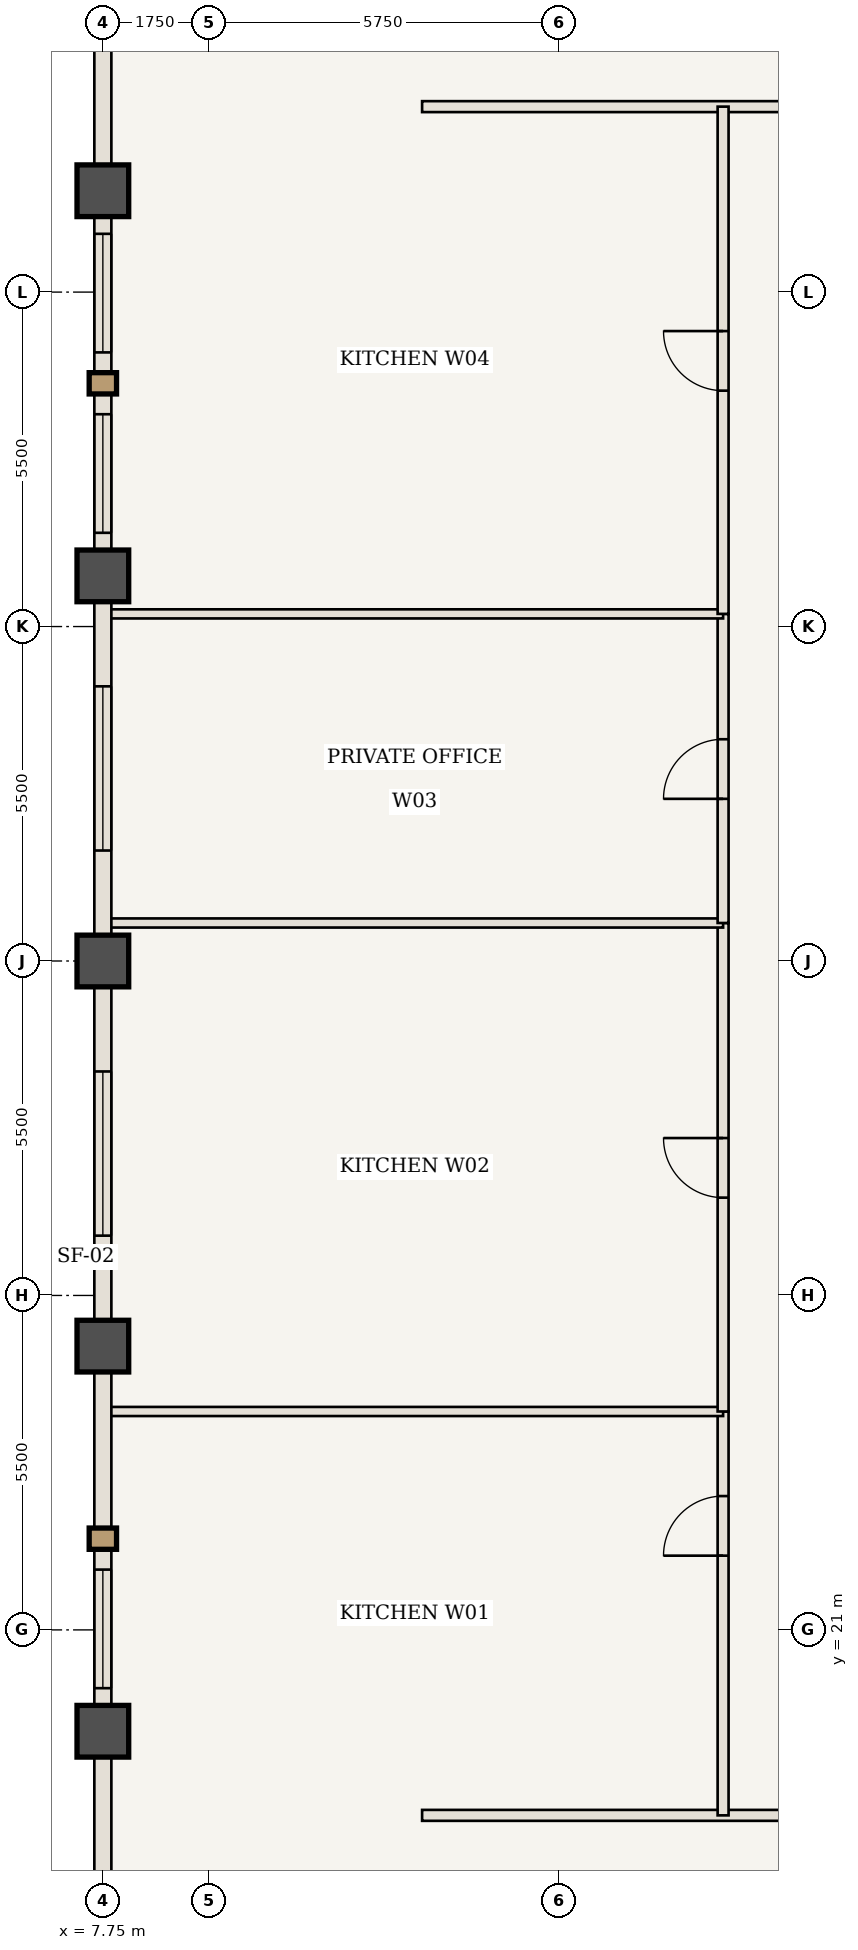
"""IFC4 building model, lengths in metres.
Left out: names, types, materials, properties, quantities, classifications, styles, units other than length and angle.
Written with IfcOpenShell. Run it as: python <this file> out.ifc"""

import sys

from ifc_helpers import new_model, si_unit, direction, frame, frame_2d, origin, origin_2d, place, context, subcontext, project, spatial, rectangle, extrude, element, fill, save


model = new_model("IFC4")
c1 = context("Model", 3, precision=1e-05, world=origin(), true_north=direction((0.0, 1.0)))
c2 = subcontext(c1, "Body", "Model", "MODEL_VIEW")
j1 = project(units=[si_unit("LENGTHUNIT", "METRE"), si_unit("PLANEANGLEUNIT", "RADIAN")], contexts=[c1])
p1 = place(None, origin())
s1 = spatial("IfcSite", under=j1, at=p1, CompositionType="ELEMENT")
p2 = place(p1, origin())
s2 = spatial("IfcBuilding", under=s1, at=p2, CompositionType="ELEMENT")
p3 = place(p2, frame((0.0, 0.0, 229.25)))
s3 = spatial("IfcBuildingStorey", under=s2, at=p3, CompositionType="ELEMENT", Elevation=229.25)
for number, where, z_axis, x_axis in (
    (1, (7.75, 19.333, 0.0), (0.0, 0.0, 1.0), (1.0, 0.0, 0.0)),
    (2, (7.75, 25.667, 0.0), (0.0, 0.0, 1.0), (1.0, 0.0, 0.0)),
    (3, (7.75, 32.0, 0.0), (0.0, 0.0, 1.0), (1.0, 0.0, 0.0)),
    (4, (7.75, 38.333, 0.0), (0.0, 0.0, 1.0), (1.0, 0.0, 0.0)),
    (5, (7.75, 44.667, 0.0), (0.0, 0.0, 1.0), (1.0, 0.0, 0.0)),
):
    element("IfcColumn", number, at=place(p3, frame(where, z_axis=z_axis, x_axis=x_axis)), inside=s3, PredefinedType="COLUMN", context=c2, shape_type="SweptSolid", body=[
        extrude(rectangle(XDim=0.85, YDim=0.85, at=origin_2d()), origin(), (0.0, 0.0, 1.0), 3.85),
    ])
p4 = place(p3, frame((13.0, 17.95, 0.0), z_axis=(0.0, 0.0, 1.0), x_axis=(1.0, 0.0, 0.0)))
e6 = element("IfcWall", 6, at=p4, inside=s3, PredefinedType="STANDARD", context=c2, shape_type="SweptSolid", body=[
    extrude(rectangle(XDim=13.292, YDim=0.18, at=frame_2d((6.646, 0.0))), origin(), (0.0, 0.0, 1.0), 3.685),
])
p5 = place(p4, frame((8.621, 0.0, 0.0)))
e7 = element("IfcOpeningElement", 7, at=p5, cuts=e6, PredefinedType="OPENING", context=c2, shape_type="SweptSolid", body=[
    extrude(rectangle(XDim=0.98, YDim=2.2, at=frame_2d((0.49, 1.1))), frame((0.0, 0.1, 0.0), z_axis=(0.0, -1.0, 0.0), x_axis=(1.0, 0.0, 0.0)), (0.0, 0.0, 1.0), 0.2),
])
p6 = place(p3, frame((13.0, 46.05, 0.0), z_axis=(0.0, 0.0, 1.0), x_axis=(1.0, 0.0, 0.0)))
e8 = element("IfcWall", 8, at=p6, inside=s3, PredefinedType="STANDARD", context=c2, shape_type="SweptSolid", body=[
    extrude(rectangle(XDim=38.0, YDim=0.18, at=frame_2d((19.0, 0.0))), origin(), (0.0, 0.0, 1.0), 3.685),
])
p7 = place(p6, frame((19.7, 0.0, 0.0)))
e9 = element("IfcOpeningElement", 9, at=p7, cuts=e8, PredefinedType="OPENING", context=c2, shape_type="SweptSolid", body=[
    extrude(rectangle(XDim=0.98, YDim=2.2, at=frame_2d((0.49, 1.1))), frame((0.0, 0.1, 0.0), z_axis=(0.0, -1.0, 0.0), x_axis=(1.0, 0.0, 0.0)), (0.0, 0.0, 1.0), 0.2),
])
p8 = place(p3, frame((17.95, 17.95, 0.0), z_axis=(0.0, 0.0, 1.0), x_axis=(0.0, 1.0, 0.0)))
e10 = element("IfcWall", 10, at=p8, inside=s3, PredefinedType="STANDARD", context=c2, shape_type="SweptSolid", body=[
    extrude(rectangle(XDim=6.642, YDim=0.18, at=frame_2d((3.321, 0.0))), origin(), (0.0, 0.0, 1.0), 3.685),
])
p9 = place(p8, frame((4.271, 0.0, 0.0)))
e11 = element("IfcOpeningElement", 11, at=p9, cuts=e10, PredefinedType="OPENING", context=c2, shape_type="SweptSolid", body=[
    extrude(rectangle(XDim=0.98, YDim=2.2, at=frame_2d((0.49, 1.1))), frame((0.0, 0.1, 0.0), z_axis=(0.0, -1.0, 0.0), x_axis=(1.0, 0.0, 0.0)), (0.0, 0.0, 1.0), 0.2),
])
p10 = place(p3, frame((7.81, 24.592, 0.0), z_axis=(0.0, 0.0, 1.0), x_axis=(1.0, 0.0, 0.0)))
e12 = element("IfcWall", 12, at=p10, inside=s3, PredefinedType="STANDARD", context=c2, shape_type="SweptSolid", body=[
    extrude(rectangle(XDim=10.14, YDim=0.15, at=frame_2d((5.07, 0.0))), origin(), (0.0, 0.0, 1.0), 3.685),
])
p11 = place(p3, frame((17.95, 24.592, 0.0), z_axis=(0.0, 0.0, 1.0), x_axis=(0.0, 1.0, 0.0)))
e13 = element("IfcWall", 13, at=p11, inside=s3, PredefinedType="STANDARD", context=c2, shape_type="SweptSolid", body=[
    extrude(rectangle(XDim=8.033, YDim=0.18, at=frame_2d((4.017, 0.0))), origin(), (0.0, 0.0, 1.0), 3.685),
])
p12 = place(p11, frame((3.517, 0.0, 0.0)))
e14 = element("IfcOpeningElement", 14, at=p12, cuts=e13, PredefinedType="OPENING", context=c2, shape_type="SweptSolid", body=[
    extrude(rectangle(XDim=0.98, YDim=2.2, at=frame_2d((0.49, 1.1))), frame((0.0, 0.1, 0.0), z_axis=(0.0, -1.0, 0.0), x_axis=(1.0, 0.0, 0.0)), (0.0, 0.0, 1.0), 0.2),
])
p13 = place(p3, frame((7.81, 32.625, 0.0), z_axis=(0.0, 0.0, 1.0), x_axis=(1.0, 0.0, 0.0)))
e15 = element("IfcWall", 15, at=p13, inside=s3, PredefinedType="STANDARD", context=c2, shape_type="SweptSolid", body=[
    extrude(rectangle(XDim=10.14, YDim=0.15, at=frame_2d((5.07, 0.0))), origin(), (0.0, 0.0, 1.0), 3.685),
])
p14 = place(p3, frame((17.95, 32.625, 0.0), z_axis=(0.0, 0.0, 1.0), x_axis=(0.0, 1.0, 0.0)))
e16 = element("IfcWall", 16, at=p14, inside=s3, PredefinedType="STANDARD", context=c2, shape_type="SweptSolid", body=[
    extrude(rectangle(XDim=5.083, YDim=0.18, at=frame_2d((2.542, 0.0))), origin(), (0.0, 0.0, 1.0), 3.685),
])
p15 = place(p14, frame((2.042, 0.0, 0.0)))
e17 = element("IfcOpeningElement", 17, at=p15, cuts=e16, PredefinedType="OPENING", context=c2, shape_type="SweptSolid", body=[
    extrude(rectangle(XDim=0.98, YDim=2.2, at=frame_2d((0.49, 1.1))), frame((0.0, 0.1, 0.0), z_axis=(0.0, -1.0, 0.0), x_axis=(1.0, 0.0, 0.0)), (0.0, 0.0, 1.0), 0.2),
])
p16 = place(p3, frame((7.81, 37.708, 0.0), z_axis=(0.0, 0.0, 1.0), x_axis=(1.0, 0.0, 0.0)))
e18 = element("IfcWall", 18, at=p16, inside=s3, PredefinedType="STANDARD", context=c2, shape_type="SweptSolid", body=[
    extrude(rectangle(XDim=10.14, YDim=0.15, at=frame_2d((5.07, 0.0))), origin(), (0.0, 0.0, 1.0), 3.685),
])
p17 = place(p3, frame((17.95, 37.708, 0.0), z_axis=(0.0, 0.0, 1.0), x_axis=(0.0, 1.0, 0.0)))
e19 = element("IfcWall", 19, at=p17, inside=s3, PredefinedType="STANDARD", context=c2, shape_type="SweptSolid", body=[
    extrude(rectangle(XDim=8.342, YDim=0.18, at=frame_2d((4.171, 0.0))), origin(), (0.0, 0.0, 1.0), 3.685),
])
p18 = place(p17, frame((3.671, 0.0, 0.0)))
e20 = element("IfcOpeningElement", 20, at=p18, cuts=e19, PredefinedType="OPENING", context=c2, shape_type="SweptSolid", body=[
    extrude(rectangle(XDim=0.98, YDim=2.2, at=frame_2d((0.49, 1.1))), frame((0.0, 0.1, 0.0), z_axis=(0.0, -1.0, 0.0), x_axis=(1.0, 0.0, 0.0)), (0.0, 0.0, 1.0), 0.2),
])
p19 = place(p3, frame((7.75, 13.0, 0.0), z_axis=(0.0, 0.0, 1.0), x_axis=(0.0, 1.0, 0.0)))
e21 = element("IfcWall", 21, at=p19, inside=s3, PredefinedType="USERDEFINED", context=c2, shape_type="SweptSolid", body=[
    extrude(rectangle(XDim=6.333, YDim=0.28, at=frame_2d((3.167, 0.0))), origin(), (0.0, 0.0, 1.0), 2.985),
])
p20 = place(p3, frame((7.75, 19.333, 0.0), z_axis=(0.0, 0.0, 1.0), x_axis=(0.0, 1.0, 0.0)))
e22 = element("IfcWall", 22, at=p20, inside=s3, PredefinedType="USERDEFINED", context=c2, shape_type="SweptSolid", body=[
    extrude(rectangle(XDim=6.333, YDim=0.28, at=frame_2d((3.167, 0.0))), origin(), (0.0, 0.0, 1.0), 2.985),
])
p21 = place(p20, frame((0.708, 0.0, 0.85)))
e23 = element("IfcOpeningElement", 23, at=p21, cuts=e22, PredefinedType="OPENING", context=c2, shape_type="SweptSolid", body=[
    extrude(rectangle(XDim=1.95, YDim=1.935, at=frame_2d((0.975, 0.968))), frame((0.0, 0.15, 0.0), z_axis=(0.0, -1.0, 0.0), x_axis=(1.0, 0.0, 0.0)), (0.0, 0.0, 1.0), 0.3),
])
p22 = place(p3, frame((7.75, 25.667, 0.0), z_axis=(0.0, 0.0, 1.0), x_axis=(0.0, 1.0, 0.0)))
e24 = element("IfcWall", 24, at=p22, inside=s3, PredefinedType="USERDEFINED", context=c2, shape_type="SweptSolid", body=[
    extrude(rectangle(XDim=6.333, YDim=0.28, at=frame_2d((3.167, 0.0))), origin(), (0.0, 0.0, 1.0), 2.985),
])
p23 = place(p22, frame((1.817, 0.0, 0.85)))
e25 = element("IfcOpeningElement", 25, at=p23, cuts=e24, PredefinedType="OPENING", context=c2, shape_type="SweptSolid", body=[
    extrude(rectangle(XDim=2.7, YDim=1.935, at=frame_2d((1.35, 0.968))), frame((0.0, 0.15, 0.0), z_axis=(0.0, -1.0, 0.0), x_axis=(1.0, 0.0, 0.0)), (0.0, 0.0, 1.0), 0.3),
])
p24 = place(p3, frame((7.75, 32.0, 0.0), z_axis=(0.0, 0.0, 1.0), x_axis=(0.0, 1.0, 0.0)))
e26 = element("IfcWall", 26, at=p24, inside=s3, PredefinedType="USERDEFINED", context=c2, shape_type="SweptSolid", body=[
    extrude(rectangle(XDim=6.333, YDim=0.28, at=frame_2d((3.167, 0.0))), origin(), (0.0, 0.0, 1.0), 2.985),
])
p25 = place(p24, frame((1.817, 0.0, 0.85)))
e27 = element("IfcOpeningElement", 27, at=p25, cuts=e26, PredefinedType="OPENING", context=c2, shape_type="SweptSolid", body=[
    extrude(rectangle(XDim=2.7, YDim=1.935, at=frame_2d((1.35, 0.968))), frame((0.0, 0.15, 0.0), z_axis=(0.0, -1.0, 0.0), x_axis=(1.0, 0.0, 0.0)), (0.0, 0.0, 1.0), 0.3),
])
p26 = place(p3, frame((7.75, 38.333, 0.0), z_axis=(0.0, 0.0, 1.0), x_axis=(0.0, 1.0, 0.0)))
e28 = element("IfcWall", 28, at=p26, inside=s3, PredefinedType="USERDEFINED", context=c2, shape_type="SweptSolid", body=[
    extrude(rectangle(XDim=6.333, YDim=0.28, at=frame_2d((3.167, 0.0))), origin(), (0.0, 0.0, 1.0), 2.985),
])
p27 = place(p26, frame((0.708, 0.0, 0.85)))
e29 = element("IfcOpeningElement", 29, at=p27, cuts=e28, PredefinedType="OPENING", context=c2, shape_type="SweptSolid", body=[
    extrude(rectangle(XDim=1.95, YDim=1.935, at=frame_2d((0.975, 0.968))), frame((0.0, 0.15, 0.0), z_axis=(0.0, -1.0, 0.0), x_axis=(1.0, 0.0, 0.0)), (0.0, 0.0, 1.0), 0.3),
])
p28 = place(p26, frame((3.675, 0.0, 0.85)))
e30 = element("IfcOpeningElement", 30, at=p28, cuts=e28, PredefinedType="OPENING", context=c2, shape_type="SweptSolid", body=[
    extrude(rectangle(XDim=1.95, YDim=1.935, at=frame_2d((0.975, 0.968))), frame((0.0, 0.15, 0.0), z_axis=(0.0, -1.0, 0.0), x_axis=(1.0, 0.0, 0.0)), (0.0, 0.0, 1.0), 0.3),
])
p29 = place(p3, frame((7.75, 44.667, 0.0), z_axis=(0.0, 0.0, 1.0), x_axis=(0.0, 1.0, 0.0)))
e31 = element("IfcWall", 31, at=p29, inside=s3, PredefinedType="USERDEFINED", context=c2, shape_type="SweptSolid", body=[
    extrude(rectangle(XDim=6.333, YDim=0.28, at=frame_2d((3.167, 0.0))), origin(), (0.0, 0.0, 1.0), 2.985),
])
p30 = place(p9, origin())
e32 = element("IfcDoor", 32, at=p30, inside=s3, OperationType="SINGLE_SWING_LEFT", PredefinedType="DOOR", context=c2, shape_type="SweptSolid", body=[
    extrude(rectangle(XDim=0.98, YDim=2.2, at=frame_2d((0.49, 1.1))), frame((0.0, 0.025, 0.0), z_axis=(0.0, -1.0, 0.0), x_axis=(1.0, 0.0, 0.0)), (0.0, 0.0, 1.0), 0.05),
])
fill(e11, e32)
p31 = place(p12, origin())
e33 = element("IfcDoor", 33, at=p31, inside=s3, OperationType="SINGLE_SWING_RIGHT", PredefinedType="DOOR", context=c2, shape_type="SweptSolid", body=[
    extrude(rectangle(XDim=0.98, YDim=2.2, at=frame_2d((0.49, 1.1))), frame((0.0, 0.025, 0.0), z_axis=(0.0, -1.0, 0.0), x_axis=(1.0, 0.0, 0.0)), (0.0, 0.0, 1.0), 0.05),
])
fill(e14, e33)
p32 = place(p15, origin())
e34 = element("IfcDoor", 34, at=p32, inside=s3, OperationType="SINGLE_SWING_LEFT", PredefinedType="DOOR", context=c2, shape_type="SweptSolid", body=[
    extrude(rectangle(XDim=0.98, YDim=2.2, at=frame_2d((0.49, 1.1))), frame((0.0, 0.025, 0.0), z_axis=(0.0, -1.0, 0.0), x_axis=(1.0, 0.0, 0.0)), (0.0, 0.0, 1.0), 0.05),
])
fill(e17, e34)
p33 = place(p18, origin())
e35 = element("IfcDoor", 35, at=p33, inside=s3, OperationType="SINGLE_SWING_RIGHT", PredefinedType="DOOR", context=c2, shape_type="SweptSolid", body=[
    extrude(rectangle(XDim=0.98, YDim=2.2, at=frame_2d((0.49, 1.1))), frame((0.0, 0.025, 0.0), z_axis=(0.0, -1.0, 0.0), x_axis=(1.0, 0.0, 0.0)), (0.0, 0.0, 1.0), 0.05),
])
fill(e20, e35)
p34 = place(p21, origin())
e36 = element("IfcWindow", 36, at=p34, inside=s3, PartitioningType="SINGLE_PANEL", PredefinedType="WINDOW", context=c2, shape_type="SweptSolid", body=[
    extrude(rectangle(XDim=1.95, YDim=1.935, at=frame_2d((0.975, 0.968))), frame((0.0, 0.03, 0.0), z_axis=(0.0, -1.0, 0.0), x_axis=(1.0, 0.0, 0.0)), (0.0, 0.0, 1.0), 0.06),
])
fill(e23, e36)
p35 = place(p23, origin())
e37 = element("IfcWindow", 37, at=p35, inside=s3, PartitioningType="SINGLE_PANEL", PredefinedType="WINDOW", context=c2, shape_type="SweptSolid", body=[
    extrude(rectangle(XDim=2.7, YDim=1.935, at=frame_2d((1.35, 0.968))), frame((0.0, 0.03, 0.0), z_axis=(0.0, -1.0, 0.0), x_axis=(1.0, 0.0, 0.0)), (0.0, 0.0, 1.0), 0.06),
])
fill(e25, e37)
p36 = place(p25, origin())
e38 = element("IfcWindow", 38, at=p36, inside=s3, PartitioningType="SINGLE_PANEL", PredefinedType="WINDOW", context=c2, shape_type="SweptSolid", body=[
    extrude(rectangle(XDim=2.7, YDim=1.935, at=frame_2d((1.35, 0.968))), frame((0.0, 0.03, 0.0), z_axis=(0.0, -1.0, 0.0), x_axis=(1.0, 0.0, 0.0)), (0.0, 0.0, 1.0), 0.06),
])
fill(e27, e38)
p37 = place(p27, origin())
e39 = element("IfcWindow", 39, at=p37, inside=s3, PartitioningType="SINGLE_PANEL", PredefinedType="WINDOW", context=c2, shape_type="SweptSolid", body=[
    extrude(rectangle(XDim=1.95, YDim=1.935, at=frame_2d((0.975, 0.968))), frame((0.0, 0.03, 0.0), z_axis=(0.0, -1.0, 0.0), x_axis=(1.0, 0.0, 0.0)), (0.0, 0.0, 1.0), 0.06),
])
fill(e29, e39)
p38 = place(p28, origin())
e40 = element("IfcWindow", 40, at=p38, inside=s3, PartitioningType="SINGLE_PANEL", PredefinedType="WINDOW", context=c2, shape_type="SweptSolid", body=[
    extrude(rectangle(XDim=1.95, YDim=1.935, at=frame_2d((0.975, 0.968))), frame((0.0, 0.03, 0.0), z_axis=(0.0, -1.0, 0.0), x_axis=(1.0, 0.0, 0.0)), (0.0, 0.0, 1.0), 0.06),
])
fill(e30, e40)
save(model, sys.argv[1])
